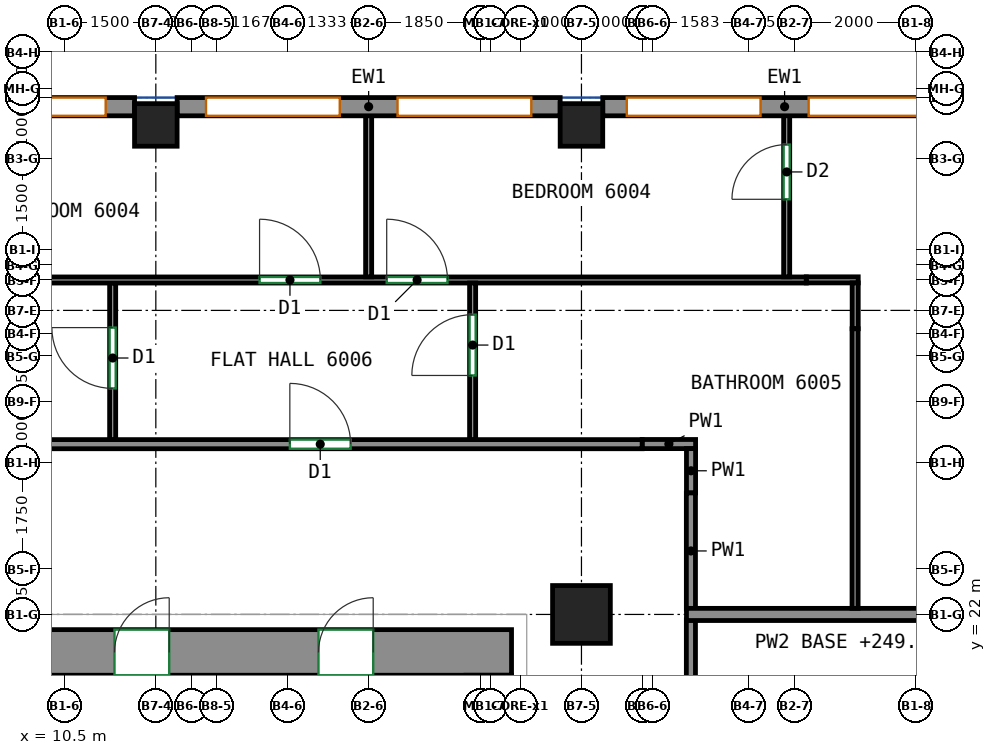
"""IFC4 building model, lengths in metres.
Left out: names, types, materials, properties, quantities, classifications, styles, units other than length and angle.
Written with IfcOpenShell. Run it as: python <this file> out.ifc"""

import sys

from ifc_helpers import new_model, si_unit, direction, frame, frame_2d, origin, origin_2d, place, context, subcontext, project, spatial, rectangle, extrude, source, transform, mapped, element, fill, save


model = new_model("IFC4")
c1 = context("Model", 3, precision=1e-05, world=origin(), true_north=direction((0.0, 1.0)))
c2 = subcontext(c1, "Body", "Model", "MODEL_VIEW")
j1 = project(units=[si_unit("LENGTHUNIT", "METRE"), si_unit("PLANEANGLEUNIT", "RADIAN")], contexts=[c1])
p1 = place(None, origin())
s1 = spatial("IfcSite", under=j1, at=p1, CompositionType="ELEMENT")
p2 = place(p1, origin())
s2 = spatial("IfcBuilding", under=s1, at=p2, CompositionType="ELEMENT")
p3 = place(p2, frame((0.0, 0.0, 249.2)))
s3 = spatial("IfcBuildingStorey", under=s2, at=p3, CompositionType="ELEMENT", Elevation=249.2)
m1 = source(origin(), c2, "Body", "SweptSolid", [
    extrude(rectangle(XDim=0.7, YDim=0.7, at=origin_2d()), origin(), (0.0, 0.0, 1.0), 3.12),
])
p4 = place(p3, frame((12.0, 30.05, 0.0), z_axis=(0.0, 0.0, 1.0), x_axis=(1.0, 0.0, 0.0)))
e1 = element("IfcColumn", 1, at=p4, inside=s3, PredefinedType="COLUMN", context=c2, shape_type="MappedRepresentation", body=[
    mapped(m1, transform((0.0, 0.0, 0.0))),
])
m2 = source(origin(), c2, "Body", "SweptSolid", [
    extrude(rectangle(XDim=0.95, YDim=0.95, at=origin_2d()), origin(), (0.0, 0.0, 1.0), 3.12),
])
p5 = place(p3, frame((19.0, 22.0, 0.0), z_axis=(0.0, 0.0, 1.0), x_axis=(1.0, 0.0, 0.0)))
e2 = element("IfcColumn", 2, at=p5, inside=s3, PredefinedType="COLUMN", context=c2, shape_type="MappedRepresentation", body=[
    mapped(m2, transform((0.0, 0.0, 0.0))),
])
p6 = place(p3, frame((19.0, 30.05, 0.0), z_axis=(0.0, 0.0, 1.0), x_axis=(1.0, 0.0, 0.0)))
e3 = element("IfcColumn", 3, at=p6, inside=s3, PredefinedType="COLUMN", context=c2, shape_type="MappedRepresentation", body=[
    mapped(m1, transform((0.0, 0.0, 0.0))),
])
m3 = source(origin(), c2, "Body", "SweptSolid", [
    extrude(rectangle(XDim=33.6, YDim=0.75, at=frame_2d((16.8, 0.0))), origin(), (0.0, 0.0, 1.0), 3.12),
])
p7 = place(p3, frame((-15.75, 21.375, 0.0), z_axis=(0.0, 0.0, 1.0), x_axis=(1.0, 0.0, 0.0)))
e4 = element("IfcWall", 4, at=p7, inside=s3, PredefinedType="SHEAR", context=c2, shape_type="MappedRepresentation", body=[
    mapped(m3, transform((0.0, 0.0, 0.0))),
])
p8 = place(p7, frame((8.27, 0.0, 0.0)))
e5 = element("IfcOpeningElement", 5, at=p8, cuts=e4, PredefinedType="OPENING", context=c2, shape_type="SweptSolid", body=[
    extrude(rectangle(XDim=0.9, YDim=2.1, at=frame_2d((0.45, 1.05))), frame((0.0, 0.385, 0.0), z_axis=(0.0, -1.0, 0.0), x_axis=(1.0, 0.0, 0.0)), (0.0, 0.0, 1.0), 0.77),
])
p9 = place(p7, frame((14.3, 0.0, 0.0)))
e6 = element("IfcOpeningElement", 6, at=p9, cuts=e4, PredefinedType="OPENING", context=c2, shape_type="SweptSolid", body=[
    extrude(rectangle(XDim=0.9, YDim=2.1, at=frame_2d((0.45, 1.05))), frame((0.0, 0.385, 0.0), z_axis=(0.0, -1.0, 0.0), x_axis=(1.0, 0.0, 0.0)), (0.0, 0.0, 1.0), 0.77),
])
p10 = place(p7, frame((19.124, 0.0, 0.0)))
e7 = element("IfcOpeningElement", 7, at=p10, cuts=e4, PredefinedType="OPENING", context=c2, shape_type="SweptSolid", body=[
    extrude(rectangle(XDim=0.9, YDim=2.1, at=frame_2d((0.45, 1.05))), frame((0.0, 0.385, 0.0), z_axis=(0.0, -1.0, 0.0), x_axis=(1.0, 0.0, 0.0)), (0.0, 0.0, 1.0), 0.77),
])
p11 = place(p7, frame((23.814, 0.0, 0.0)))
e8 = element("IfcOpeningElement", 8, at=p11, cuts=e4, PredefinedType="OPENING", context=c2, shape_type="SweptSolid", body=[
    extrude(rectangle(XDim=0.9, YDim=2.1, at=frame_2d((0.45, 1.05))), frame((0.0, 0.385, 0.0), z_axis=(0.0, -1.0, 0.0), x_axis=(1.0, 0.0, 0.0)), (0.0, 0.0, 1.0), 0.77),
])
p12 = place(p7, frame((27.07, 0.0, 0.0)))
e9 = element("IfcOpeningElement", 9, at=p12, cuts=e4, PredefinedType="OPENING", context=c2, shape_type="SweptSolid", body=[
    extrude(rectangle(XDim=0.9, YDim=2.1, at=frame_2d((0.45, 1.05))), frame((0.0, 0.385, 0.0), z_axis=(0.0, -1.0, 0.0), x_axis=(1.0, 0.0, 0.0)), (0.0, 0.0, 1.0), 0.77),
])
p13 = place(p7, frame((2.275, 0.0, 0.0)))
e10 = element("IfcOpeningElement", 10, at=p13, cuts=e4, PredefinedType="OPENING", context=c2, shape_type="SweptSolid", body=[
    extrude(rectangle(XDim=0.9, YDim=2.1, at=frame_2d((0.45, 1.05))), frame((0.0, 0.385, 0.0), z_axis=(0.0, -1.0, 0.0), x_axis=(1.0, 0.0, 0.0)), (0.0, 0.0, 1.0), 0.77),
])
p14 = place(p7, frame((30.425, 0.0, 0.0)))
e11 = element("IfcOpeningElement", 11, at=p14, cuts=e4, PredefinedType="OPENING", context=c2, shape_type="SweptSolid", body=[
    extrude(rectangle(XDim=0.9, YDim=2.1, at=frame_2d((0.45, 1.05))), frame((0.0, 0.385, 0.0), z_axis=(0.0, -1.0, 0.0), x_axis=(1.0, 0.0, 0.0)), (0.0, 0.0, 1.0), 0.77),
])
m4 = source(origin(), c2, "Body", "SweptSolid", [
    extrude(rectangle(XDim=5.982, YDim=0.3, at=frame_2d((2.991, 0.0))), origin(), (0.0, 0.0, 1.0), 3.12),
])
p15 = place(p3, frame((25.332, 30.35, 0.0), z_axis=(0.0, 0.0, 1.0), x_axis=(-1.0, 0.0, 0.0)))
e12 = element("IfcWall", 12, at=p15, inside=s3, PredefinedType="SOLIDWALL", context=c2, shape_type="MappedRepresentation", body=[
    mapped(m4, transform((0.0, 0.0, 0.0))),
])
p16 = place(p15, frame((0.396, 0.0, 0.8)))
e13 = element("IfcOpeningElement", 13, at=p16, cuts=e12, PredefinedType="OPENING", context=c2, shape_type="SweptSolid", body=[
    extrude(rectangle(XDim=2.2, YDim=2.05, at=frame_2d((1.1, 1.025))), frame((0.0, 0.16, 0.0), z_axis=(0.0, -1.0, 0.0), x_axis=(1.0, 0.0, 0.0)), (0.0, 0.0, 1.0), 0.32),
])
p17 = place(p15, frame((3.386, 0.0, 0.8)))
e14 = element("IfcOpeningElement", 14, at=p17, cuts=e12, PredefinedType="OPENING", context=c2, shape_type="SweptSolid", body=[
    extrude(rectangle(XDim=2.2, YDim=2.05, at=frame_2d((1.1, 1.025))), frame((0.0, 0.16, 0.0), z_axis=(0.0, -1.0, 0.0), x_axis=(1.0, 0.0, 0.0)), (0.0, 0.0, 1.0), 0.32),
])
m5 = source(origin(), c2, "Body", "SweptSolid", [
    extrude(rectangle(XDim=6.3, YDim=0.3, at=frame_2d((3.15, 0.0))), origin(), (0.0, 0.0, 1.0), 3.12),
])
p18 = place(p3, frame((18.65, 30.35, 0.0), z_axis=(0.0, 0.0, 1.0), x_axis=(-1.0, 0.0, 0.0)))
e15 = element("IfcWall", 15, at=p18, inside=s3, PredefinedType="SOLIDWALL", context=c2, shape_type="MappedRepresentation", body=[
    mapped(m5, transform((0.0, 0.0, 0.0))),
])
p19 = place(p18, frame((0.475, 0.0, 0.8)))
e16 = element("IfcOpeningElement", 16, at=p19, cuts=e15, PredefinedType="OPENING", context=c2, shape_type="SweptSolid", body=[
    extrude(rectangle(XDim=2.2, YDim=2.05, at=frame_2d((1.1, 1.025))), frame((0.0, 0.16, 0.0), z_axis=(0.0, -1.0, 0.0), x_axis=(1.0, 0.0, 0.0)), (0.0, 0.0, 1.0), 0.32),
])
p20 = place(p18, frame((3.625, 0.0, 0.8)))
e17 = element("IfcOpeningElement", 17, at=p20, cuts=e15, PredefinedType="OPENING", context=c2, shape_type="SweptSolid", body=[
    extrude(rectangle(XDim=2.2, YDim=2.05, at=frame_2d((1.1, 1.025))), frame((0.0, 0.16, 0.0), z_axis=(0.0, -1.0, 0.0), x_axis=(1.0, 0.0, 0.0)), (0.0, 0.0, 1.0), 0.32),
])
p21 = place(p3, frame((11.65, 30.35, 0.0), z_axis=(0.0, 0.0, 1.0), x_axis=(-1.0, 0.0, 0.0)))
e18 = element("IfcWall", 18, at=p21, inside=s3, PredefinedType="SOLIDWALL", context=c2, shape_type="MappedRepresentation", body=[
    mapped(m5, transform((0.0, 0.0, 0.0))),
])
p22 = place(p21, frame((0.475, 0.0, 0.8)))
e19 = element("IfcOpeningElement", 19, at=p22, cuts=e18, PredefinedType="OPENING", context=c2, shape_type="SweptSolid", body=[
    extrude(rectangle(XDim=2.2, YDim=2.05, at=frame_2d((1.1, 1.025))), frame((0.0, 0.16, 0.0), z_axis=(0.0, -1.0, 0.0), x_axis=(1.0, 0.0, 0.0)), (0.0, 0.0, 1.0), 0.32),
])
p23 = place(p21, frame((3.625, 0.0, 0.8)))
e20 = element("IfcOpeningElement", 20, at=p23, cuts=e18, PredefinedType="OPENING", context=c2, shape_type="SweptSolid", body=[
    extrude(rectangle(XDim=2.2, YDim=2.05, at=frame_2d((1.1, 1.025))), frame((0.0, 0.16, 0.0), z_axis=(0.0, -1.0, 0.0), x_axis=(1.0, 0.0, 0.0)), (0.0, 0.0, 1.0), 0.32),
])
p24 = place(p3, frame((20.8, 17.75, 0.0), z_axis=(0.0, 0.0, 1.0), x_axis=(0.0, 1.0, 0.0)))
e21 = element("IfcWall", 21, at=p24, inside=s3, PredefinedType="PARTITIONING", context=c2, shape_type="SweptSolid", body=[
    extrude(rectangle(XDim=4.16, YDim=0.15, at=frame_2d((2.08, 0.0))), origin(), (0.0, 0.0, 1.0), 3.12),
])
p25 = place(p3, frame((20.877, 24.802, 0.0), z_axis=(0.0, 0.0, 1.0), x_axis=(-1.0, 0.0, 0.0)))
e22 = element("IfcWall", 22, at=p25, inside=s3, PredefinedType="PARTITIONING", context=c2, shape_type="SweptSolid", body=[
    extrude(rectangle(XDim=0.879, YDim=0.15, at=frame_2d((0.439, 0.0))), origin(), (0.0, 0.0, 1.0), 3.12),
])
p26 = place(p3, frame((20.802, 23.998, 0.0), z_axis=(0.0, 0.0, 1.0), x_axis=(0.0, 1.0, 0.0)))
e23 = element("IfcWall", 23, at=p26, inside=s3, PredefinedType="PARTITIONING", context=c2, shape_type="SweptSolid", body=[
    extrude(rectangle(XDim=0.729, YDim=0.15, at=frame_2d((0.365, 0.0))), origin(), (0.0, 0.0, 1.0), 3.12),
])
p27 = place(p3, frame((20.8, 22.09, 0.0), z_axis=(0.0, 0.0, 1.0), x_axis=(0.0, 1.0, 0.0)))
e24 = element("IfcWall", 24, at=p27, inside=s3, PredefinedType="PARTITIONING", context=c2, shape_type="SweptSolid", body=[
    extrude(rectangle(XDim=1.908, YDim=0.15, at=frame_2d((0.954, 0.0))), origin(), (0.0, 0.0, 1.0), 3.12),
])
p28 = place(p3, frame((-16.075, 24.8, 0.0), z_axis=(0.0, 0.0, 1.0), x_axis=(1.0, 0.0, 0.0)))
e25 = element("IfcWall", 25, at=p28, inside=s3, PredefinedType="PARTITIONING", context=c2, shape_type="SweptSolid", body=[
    extrude(rectangle(XDim=36.073, YDim=0.15, at=frame_2d((18.037, 0.0))), origin(), (0.0, 0.0, 1.0), 3.12),
])
p29 = place(p28, frame((16.771, 0.0, 0.0)))
e26 = element("IfcOpeningElement", 26, at=p29, cuts=e25, PredefinedType="OPENING", context=c2, shape_type="SweptSolid", body=[
    extrude(rectangle(XDim=0.9, YDim=2.1, at=frame_2d((0.45, 1.05))), frame((0.0, 0.085, 0.0), z_axis=(0.0, -1.0, 0.0), x_axis=(1.0, 0.0, 0.0)), (0.0, 0.0, 1.0), 0.17),
])
p30 = place(p28, frame((30.279, 0.0, 0.0)))
e27 = element("IfcOpeningElement", 27, at=p30, cuts=e25, PredefinedType="OPENING", context=c2, shape_type="SweptSolid", body=[
    extrude(rectangle(XDim=1.0, YDim=2.1, at=frame_2d((0.5, 1.05))), frame((0.0, 0.085, 0.0), z_axis=(0.0, -1.0, 0.0), x_axis=(1.0, 0.0, 0.0)), (0.0, 0.0, 1.0), 0.17),
])
p31 = place(p3, frame((20.727, 22.0, 0.0), z_axis=(0.0, 0.0, 1.0), x_axis=(1.0, 0.0, 0.0)))
e28 = element("IfcWall", 28, at=p31, inside=s3, PredefinedType="PARTITIONING", context=c2, shape_type="SweptSolid", body=[
    extrude(rectangle(XDim=7.973, YDim=0.2, at=frame_2d((3.986, 0.0))), origin(), (0.0, 0.0, 1.0), 2.57),
])
p32 = place(p3, frame((11.29, 24.877, 0.0), z_axis=(0.0, 0.0, 1.0), x_axis=(0.0, 1.0, 0.0)))
e29 = element("IfcWall", 29, at=p32, inside=s3, PredefinedType="PARTITIONING", context=c2, shape_type="SweptSolid", body=[
    extrude(rectangle(XDim=2.573, YDim=0.1, at=frame_2d((1.287, 0.0))), origin(), (0.0, 0.0, 1.0), 3.12),
])
p33 = place(p32, frame((0.84, 0.0, 0.0)))
e30 = element("IfcOpeningElement", 30, at=p33, cuts=e29, PredefinedType="OPENING", context=c2, shape_type="SweptSolid", body=[
    extrude(rectangle(XDim=1.0, YDim=2.1, at=frame_2d((0.5, 1.05))), frame((0.0, 0.06, 0.0), z_axis=(0.0, -1.0, 0.0), x_axis=(1.0, 0.0, 0.0)), (0.0, 0.0, 1.0), 0.12),
])
p34 = place(p3, frame((4.9, 27.5, 0.0), z_axis=(0.0, 0.0, 1.0), x_axis=(1.0, 0.0, 0.0)))
e31 = element("IfcWall", 31, at=p34, inside=s3, PredefinedType="PARTITIONING", context=c2, shape_type="SweptSolid", body=[
    extrude(rectangle(XDim=17.798, YDim=0.1, at=frame_2d((8.899, 0.0))), origin(), (0.0, 0.0, 1.0), 3.12),
])
p35 = place(p34, frame((8.806, 0.0, 0.0)))
e32 = element("IfcOpeningElement", 32, at=p35, cuts=e31, PredefinedType="OPENING", context=c2, shape_type="SweptSolid", body=[
    extrude(rectangle(XDim=1.0, YDim=2.1, at=frame_2d((0.5, 1.05))), frame((0.0, 0.06, 0.0), z_axis=(0.0, -1.0, 0.0), x_axis=(1.0, 0.0, 0.0)), (0.0, 0.0, 1.0), 0.12),
])
p36 = place(p34, frame((10.897, 0.0, 0.0)))
e33 = element("IfcOpeningElement", 33, at=p36, cuts=e31, PredefinedType="OPENING", context=c2, shape_type="SweptSolid", body=[
    extrude(rectangle(XDim=1.0, YDim=2.1, at=frame_2d((0.5, 1.05))), frame((0.0, 0.06, 0.0), z_axis=(0.0, -1.0, 0.0), x_axis=(1.0, 0.0, 0.0)), (0.0, 0.0, 1.0), 0.12),
])
p37 = place(p3, frame((17.21, 24.877, 0.0), z_axis=(0.0, 0.0, 1.0), x_axis=(0.0, 1.0, 0.0)))
e34 = element("IfcWall", 34, at=p37, inside=s3, PredefinedType="PARTITIONING", context=c2, shape_type="SweptSolid", body=[
    extrude(rectangle(XDim=2.573, YDim=0.1, at=frame_2d((1.287, 0.0))), origin(), (0.0, 0.0, 1.0), 3.12),
])
p38 = place(p37, frame((1.053, 0.0, 0.0)))
e35 = element("IfcOpeningElement", 35, at=p38, cuts=e34, PredefinedType="OPENING", context=c2, shape_type="SweptSolid", body=[
    extrude(rectangle(XDim=1.0, YDim=2.1, at=frame_2d((0.5, 1.05))), frame((0.0, 0.06, 0.0), z_axis=(0.0, -1.0, 0.0), x_axis=(1.0, 0.0, 0.0)), (0.0, 0.0, 1.0), 0.12),
])
p39 = place(p3, frame((23.552, 27.502, 0.0), z_axis=(0.0, 0.0, 1.0), x_axis=(-1.0, 0.0, 0.0)))
e36 = element("IfcWall", 36, at=p39, inside=s3, PredefinedType="PARTITIONING", context=c2, shape_type="SweptSolid", body=[
    extrude(rectangle(XDim=0.854, YDim=0.1, at=frame_2d((0.427, 0.0))), origin(), (0.0, 0.0, 1.0), 3.12),
])
p40 = place(p3, frame((23.502, 26.698, 0.0), z_axis=(0.0, 0.0, 1.0), x_axis=(0.0, 1.0, 0.0)))
e37 = element("IfcWall", 37, at=p40, inside=s3, PredefinedType="PARTITIONING", context=c2, shape_type="SweptSolid", body=[
    extrude(rectangle(XDim=0.754, YDim=0.1, at=frame_2d((0.377, 0.0))), origin(), (0.0, 0.0, 1.0), 3.12),
])
p41 = place(p3, frame((23.5, 22.1, 0.0), z_axis=(0.0, 0.0, 1.0), x_axis=(0.0, 1.0, 0.0)))
e38 = element("IfcWall", 38, at=p41, inside=s3, PredefinedType="PARTITIONING", context=c2, shape_type="SweptSolid", body=[
    extrude(rectangle(XDim=4.598, YDim=0.1, at=frame_2d((2.299, 0.0))), origin(), (0.0, 0.0, 1.0), 3.12),
])
p42 = place(p3, frame((15.5, 27.552, 0.0), z_axis=(0.0, 0.0, 1.0), x_axis=(0.0, 1.0, 0.0)))
e39 = element("IfcWall", 39, at=p42, inside=s3, PredefinedType="PARTITIONING", context=c2, shape_type="SweptSolid", body=[
    extrude(rectangle(XDim=2.698, YDim=0.1, at=frame_2d((1.349, 0.0))), origin(), (0.0, 0.0, 1.0), 3.12),
])
p43 = place(p3, frame((22.375, 27.552, 0.0), z_axis=(0.0, 0.0, 1.0), x_axis=(0.0, 1.0, 0.0)))
e40 = element("IfcWall", 40, at=p43, inside=s3, PredefinedType="PARTITIONING", context=c2, shape_type="SweptSolid", body=[
    extrude(rectangle(XDim=2.698, YDim=0.1, at=frame_2d((1.349, 0.0))), origin(), (0.0, 0.0, 1.0), 3.12),
])
p44 = place(p43, frame((1.275, 0.0, 0.0)))
e41 = element("IfcOpeningElement", 41, at=p44, cuts=e40, PredefinedType="OPENING", context=c2, shape_type="SweptSolid", body=[
    extrude(rectangle(XDim=0.9, YDim=2.1, at=frame_2d((0.45, 1.05))), frame((0.0, 0.06, 0.0), z_axis=(0.0, -1.0, 0.0), x_axis=(1.0, 0.0, 0.0)), (0.0, 0.0, 1.0), 0.12),
])
p45 = place(p16, origin())
e42 = element("IfcWindow", 42, at=p45, inside=s3, PartitioningType="SINGLE_PANEL", PredefinedType="WINDOW", context=c2, shape_type="SweptSolid", body=[
    extrude(rectangle(XDim=2.2, YDim=2.05, at=frame_2d((1.1, 1.025))), frame((0.0, 0.03, 0.0), z_axis=(0.0, -1.0, 0.0), x_axis=(1.0, 0.0, 0.0)), (0.0, 0.0, 1.0), 0.06),
])
fill(e13, e42)
p46 = place(p17, origin())
e43 = element("IfcWindow", 43, at=p46, inside=s3, PartitioningType="SINGLE_PANEL", PredefinedType="WINDOW", context=c2, shape_type="SweptSolid", body=[
    extrude(rectangle(XDim=2.2, YDim=2.05, at=frame_2d((1.1, 1.025))), frame((0.0, 0.03, 0.0), z_axis=(0.0, -1.0, 0.0), x_axis=(1.0, 0.0, 0.0)), (0.0, 0.0, 1.0), 0.06),
])
fill(e14, e43)
p47 = place(p19, origin())
e44 = element("IfcWindow", 44, at=p47, inside=s3, PartitioningType="SINGLE_PANEL", PredefinedType="WINDOW", context=c2, shape_type="SweptSolid", body=[
    extrude(rectangle(XDim=2.2, YDim=2.05, at=frame_2d((1.1, 1.025))), frame((0.0, 0.03, 0.0), z_axis=(0.0, -1.0, 0.0), x_axis=(1.0, 0.0, 0.0)), (0.0, 0.0, 1.0), 0.06),
])
fill(e16, e44)
p48 = place(p20, origin())
e45 = element("IfcWindow", 45, at=p48, inside=s3, PartitioningType="SINGLE_PANEL", PredefinedType="WINDOW", context=c2, shape_type="SweptSolid", body=[
    extrude(rectangle(XDim=2.2, YDim=2.05, at=frame_2d((1.1, 1.025))), frame((0.0, 0.03, 0.0), z_axis=(0.0, -1.0, 0.0), x_axis=(1.0, 0.0, 0.0)), (0.0, 0.0, 1.0), 0.06),
])
fill(e17, e45)
p49 = place(p22, origin())
e46 = element("IfcWindow", 46, at=p49, inside=s3, PartitioningType="SINGLE_PANEL", PredefinedType="WINDOW", context=c2, shape_type="SweptSolid", body=[
    extrude(rectangle(XDim=2.2, YDim=2.05, at=frame_2d((1.1, 1.025))), frame((0.0, 0.03, 0.0), z_axis=(0.0, -1.0, 0.0), x_axis=(1.0, 0.0, 0.0)), (0.0, 0.0, 1.0), 0.06),
])
fill(e19, e46)
p50 = place(p12, origin())
e47 = element("IfcDoor", 47, at=p50, inside=s3, OperationType="SINGLE_SWING_RIGHT", PredefinedType="DOOR", context=c2, shape_type="SweptSolid", body=[
    extrude(rectangle(XDim=0.9, YDim=2.1, at=frame_2d((0.45, 1.05))), frame((0.0, -0.23, 0.0), z_axis=(0.0, -1.0, 0.0), x_axis=(1.0, 0.0, 0.0)), (0.0, 0.0, 1.0), 0.05),
])
fill(e9, e47)
p51 = place(p14, origin())
e48 = element("IfcDoor", 48, at=p51, inside=s3, OperationType="SINGLE_SWING_RIGHT", PredefinedType="DOOR", context=c2, shape_type="SweptSolid", body=[
    extrude(rectangle(XDim=0.9, YDim=2.1, at=frame_2d((0.45, 1.05))), frame((0.0, -0.23, 0.0), z_axis=(0.0, -1.0, 0.0), x_axis=(1.0, 0.0, 0.0)), (0.0, 0.0, 1.0), 0.05),
])
fill(e11, e48)
p52 = place(p30, origin())
e49 = element("IfcDoor", 49, at=p52, inside=s3, OperationType="SINGLE_SWING_LEFT", PredefinedType="DOOR", context=c2, shape_type="SweptSolid", body=[
    extrude(rectangle(XDim=1.0, YDim=2.1, at=frame_2d((0.5, 1.05))), frame((0.0, 0.025, 0.0), z_axis=(0.0, -1.0, 0.0), x_axis=(1.0, 0.0, 0.0)), (0.0, 0.0, 1.0), 0.05),
])
fill(e27, e49)
p53 = place(p33, origin())
e50 = element("IfcDoor", 50, at=p53, inside=s3, OperationType="SINGLE_SWING_RIGHT", PredefinedType="DOOR", context=c2, shape_type="SweptSolid", body=[
    extrude(rectangle(XDim=1.0, YDim=2.1, at=frame_2d((0.5, 1.05))), frame((0.0, 0.025, 0.0), z_axis=(0.0, -1.0, 0.0), x_axis=(1.0, 0.0, 0.0)), (0.0, 0.0, 1.0), 0.05),
])
fill(e30, e50)
p54 = place(p38, origin())
e51 = element("IfcDoor", 51, at=p54, inside=s3, OperationType="SINGLE_SWING_LEFT", PredefinedType="DOOR", context=c2, shape_type="SweptSolid", body=[
    extrude(rectangle(XDim=1.0, YDim=2.1, at=frame_2d((0.5, 1.05))), frame((0.0, 0.025, 0.0), z_axis=(0.0, -1.0, 0.0), x_axis=(1.0, 0.0, 0.0)), (0.0, 0.0, 1.0), 0.05),
])
fill(e35, e51)
p55 = place(p35, origin())
e52 = element("IfcDoor", 52, at=p55, inside=s3, OperationType="SINGLE_SWING_LEFT", PredefinedType="DOOR", context=c2, shape_type="SweptSolid", body=[
    extrude(rectangle(XDim=1.0, YDim=2.1, at=frame_2d((0.5, 1.05))), frame((0.0, 0.025, 0.0), z_axis=(0.0, -1.0, 0.0), x_axis=(1.0, 0.0, 0.0)), (0.0, 0.0, 1.0), 0.05),
])
fill(e32, e52)
p56 = place(p36, origin())
e53 = element("IfcDoor", 53, at=p56, inside=s3, OperationType="SINGLE_SWING_LEFT", PredefinedType="DOOR", context=c2, shape_type="SweptSolid", body=[
    extrude(rectangle(XDim=1.0, YDim=2.1, at=frame_2d((0.5, 1.05))), frame((0.0, 0.025, 0.0), z_axis=(0.0, -1.0, 0.0), x_axis=(1.0, 0.0, 0.0)), (0.0, 0.0, 1.0), 0.05),
])
fill(e33, e53)
p57 = place(p44, origin())
e54 = element("IfcDoor", 54, at=p57, inside=s3, OperationType="SINGLE_SWING_LEFT", PredefinedType="DOOR", context=c2, shape_type="SweptSolid", body=[
    extrude(rectangle(XDim=0.9, YDim=2.1, at=frame_2d((0.45, 1.05))), frame((0.0, 0.025, 0.0), z_axis=(0.0, -1.0, 0.0), x_axis=(1.0, 0.0, 0.0)), (0.0, 0.0, 1.0), 0.05),
])
fill(e41, e54)
save(model, sys.argv[1])
